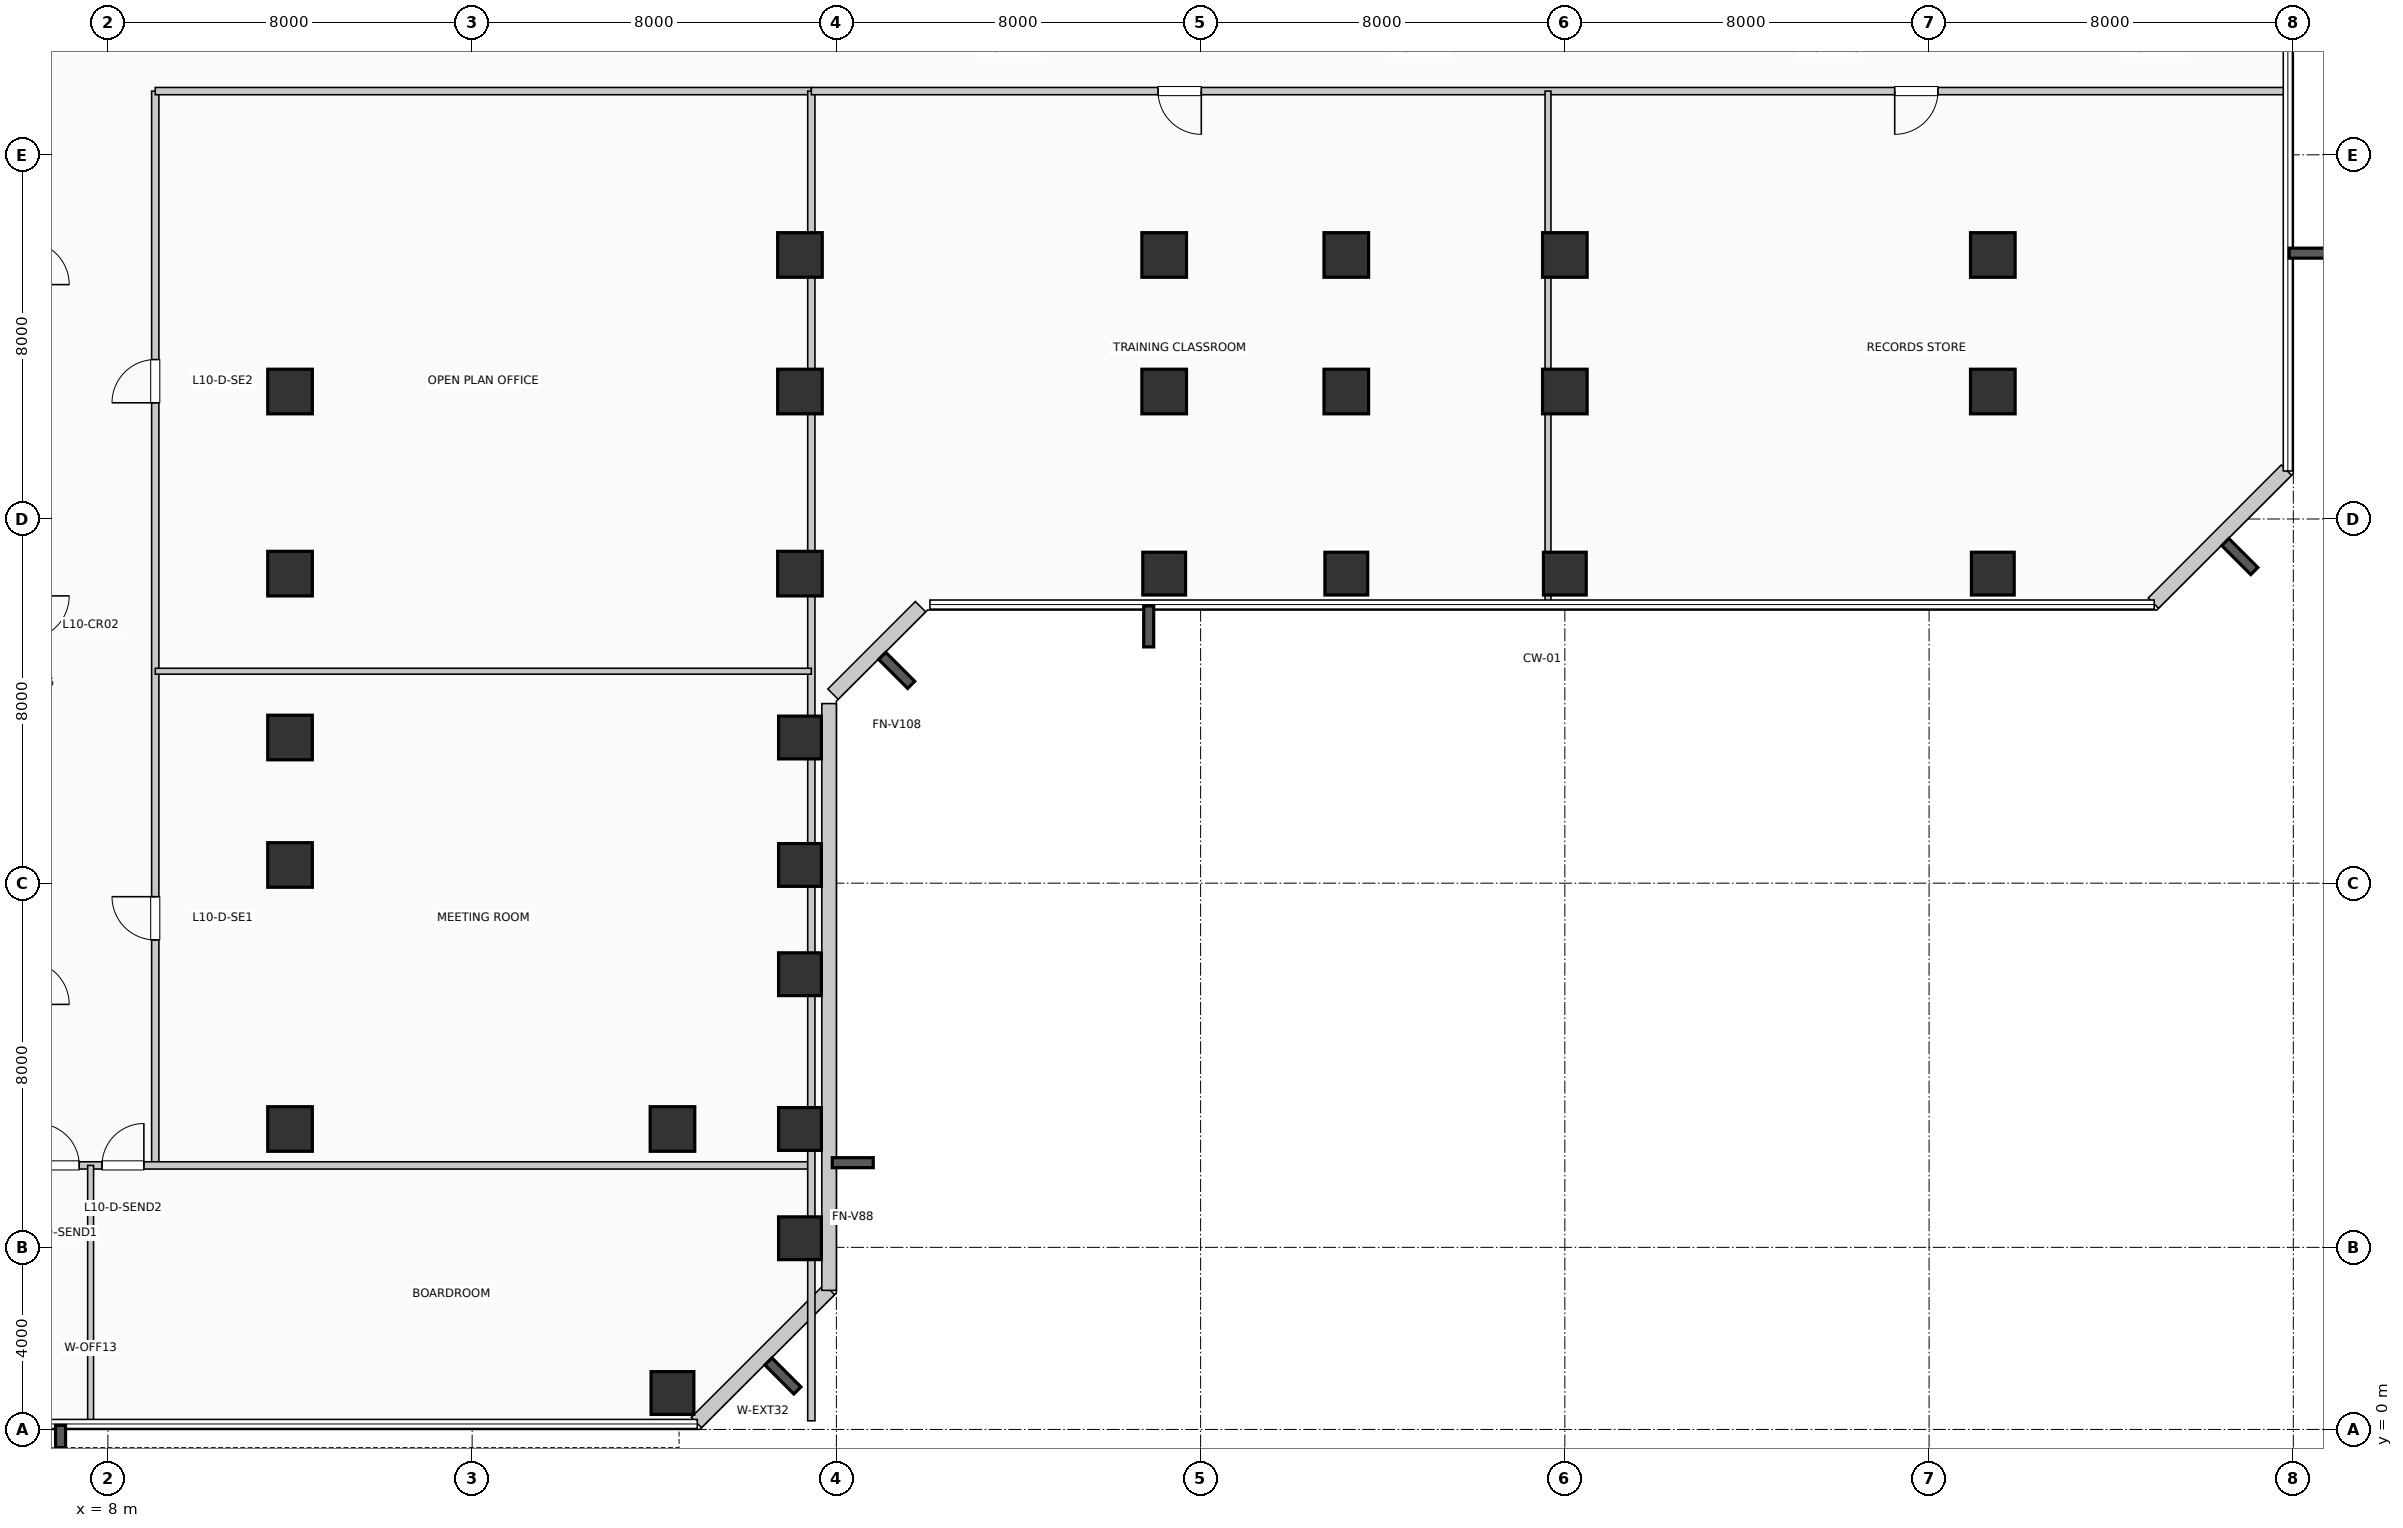
"""IFC4 building model, lengths in metres.
Left out: names, types, materials, properties, quantities, classifications, styles, units other than length and angle.
Written with IfcOpenShell. Run it as: python <this file> out.ifc"""

import sys

from ifc_helpers import new_model, si_unit, direction, frame, frame_2d, origin, origin_2d, place, context, subcontext, project, spatial, rectangle, extrude, element, fill, save


model = new_model("IFC4")
c1 = context("Model", 3, precision=1e-05, world=origin(), true_north=direction((0.0, 1.0)))
c2 = subcontext(c1, "Body", "Model", "MODEL_VIEW")
j1 = project(units=[si_unit("LENGTHUNIT", "METRE"), si_unit("PLANEANGLEUNIT", "RADIAN")], contexts=[c1])
p1 = place(None, origin())
s1 = spatial("IfcSite", under=j1, at=p1, CompositionType="ELEMENT")
p2 = place(p1, origin())
s2 = spatial("IfcBuilding", under=s1, at=p2, CompositionType="ELEMENT")
p3 = place(p2, frame((0.0, 0.0, 46.2)))
s3 = spatial("IfcBuildingStorey", under=s2, at=p3, CompositionType="ELEMENT", Elevation=46.2)
for number, where, z_axis, x_axis in (
    (1, (12.0, 6.6, 0.0), (0.0, 0.0, 1.0), (1.0, 0.0, 0.0)),
    (2, (12.0, 12.4, 0.0), (0.0, 0.0, 1.0), (1.0, 0.0, 0.0)),
    (3, (12.0, 15.2, 0.0), (0.0, 0.0, 1.0), (1.0, 0.0, 0.0)),
    (4, (12.0, 18.8, 0.0), (0.0, 0.0, 1.0), (1.0, 0.0, 0.0)),
    (5, (12.0, 22.8, 0.0), (0.0, 0.0, 1.0), (1.0, 0.0, 0.0)),
):
    element("IfcColumn", number, at=place(p3, frame(where, z_axis=z_axis, x_axis=x_axis)), inside=s3, PredefinedType="COLUMN", context=c2, shape_type="SweptSolid", body=[
        extrude(rectangle(XDim=0.98, YDim=0.98, at=origin_2d()), origin(), (0.0, 0.0, 1.0), 3.96),
    ])
p4 = place(p3, frame((20.4, 0.8, 0.0), z_axis=(0.0, 0.0, 1.0), x_axis=(1.0, 0.0, 0.0)))
e6 = element("IfcColumn", 6, at=p4, inside=s3, PredefinedType="COLUMN", context=c2, shape_type="SweptSolid", body=[
    extrude(rectangle(XDim=0.94, YDim=0.94, at=origin_2d()), origin(), (0.0, 0.0, 1.0), 3.96),
])
p5 = place(p3, frame((20.4, 6.6, 0.0), z_axis=(0.0, 0.0, 1.0), x_axis=(1.0, 0.0, 0.0)))
e7 = element("IfcColumn", 7, at=p5, inside=s3, PredefinedType="COLUMN", context=c2, shape_type="SweptSolid", body=[
    extrude(rectangle(XDim=0.98, YDim=0.98, at=origin_2d()), origin(), (0.0, 0.0, 1.0), 3.96),
])
for number, where, z_axis, x_axis in (
    (8, (23.2, 4.2, 0.0), (0.0, 0.0, 1.0), (1.0, 0.0, 0.0)),
    (9, (23.2, 6.6, 0.0), (0.0, 0.0, 1.0), (1.0, 0.0, 0.0)),
    (10, (23.2, 10.0, 0.0), (0.0, 0.0, 1.0), (1.0, 0.0, 0.0)),
    (11, (23.2, 12.4, 0.0), (0.0, 0.0, 1.0), (1.0, 0.0, 0.0)),
    (12, (23.2, 15.2, 0.0), (0.0, 0.0, 1.0), (1.0, 0.0, 0.0)),
):
    element("IfcColumn", number, at=place(p3, frame(where, z_axis=z_axis, x_axis=x_axis)), inside=s3, PredefinedType="COLUMN", context=c2, shape_type="SweptSolid", body=[
        extrude(rectangle(XDim=0.94, YDim=0.94, at=origin_2d()), origin(), (0.0, 0.0, 1.0), 3.96),
    ])
for number, where, z_axis, x_axis in (
    (13, (23.2, 18.8, 0.0), (0.0, 0.0, 1.0), (1.0, 0.0, 0.0)),
    (14, (23.2, 22.8, 0.0), (0.0, 0.0, 1.0), (1.0, 0.0, 0.0)),
    (15, (23.2, 25.8, 0.0), (0.0, 0.0, 1.0), (1.0, 0.0, 0.0)),
):
    element("IfcColumn", number, at=place(p3, frame(where, z_axis=z_axis, x_axis=x_axis)), inside=s3, PredefinedType="COLUMN", context=c2, shape_type="SweptSolid", body=[
        extrude(rectangle(XDim=0.98, YDim=0.98, at=origin_2d()), origin(), (0.0, 0.0, 1.0), 3.96),
    ])
p6 = place(p3, frame((31.2, 18.8, 0.0), z_axis=(0.0, 0.0, 1.0), x_axis=(1.0, 0.0, 0.0)))
e16 = element("IfcColumn", 16, at=p6, inside=s3, PredefinedType="COLUMN", context=c2, shape_type="SweptSolid", body=[
    extrude(rectangle(XDim=0.94, YDim=0.94, at=origin_2d()), origin(), (0.0, 0.0, 1.0), 3.96),
])
for number, where, z_axis, x_axis in (
    (17, (31.2, 22.8, 0.0), (0.0, 0.0, 1.0), (1.0, 0.0, 0.0)),
    (18, (31.2, 25.8, 0.0), (0.0, 0.0, 1.0), (1.0, 0.0, 0.0)),
):
    element("IfcColumn", number, at=place(p3, frame(where, z_axis=z_axis, x_axis=x_axis)), inside=s3, PredefinedType="COLUMN", context=c2, shape_type="SweptSolid", body=[
        extrude(rectangle(XDim=0.98, YDim=0.98, at=origin_2d()), origin(), (0.0, 0.0, 1.0), 3.96),
    ])
p7 = place(p3, frame((35.2, 18.8, 0.0), z_axis=(0.0, 0.0, 1.0), x_axis=(1.0, 0.0, 0.0)))
e19 = element("IfcColumn", 19, at=p7, inside=s3, PredefinedType="COLUMN", context=c2, shape_type="SweptSolid", body=[
    extrude(rectangle(XDim=0.94, YDim=0.94, at=origin_2d()), origin(), (0.0, 0.0, 1.0), 3.96),
])
for number, where, z_axis, x_axis in (
    (20, (35.2, 22.8, 0.0), (0.0, 0.0, 1.0), (1.0, 0.0, 0.0)),
    (21, (35.2, 25.8, 0.0), (0.0, 0.0, 1.0), (1.0, 0.0, 0.0)),
):
    element("IfcColumn", number, at=place(p3, frame(where, z_axis=z_axis, x_axis=x_axis)), inside=s3, PredefinedType="COLUMN", context=c2, shape_type="SweptSolid", body=[
        extrude(rectangle(XDim=0.98, YDim=0.98, at=origin_2d()), origin(), (0.0, 0.0, 1.0), 3.96),
    ])
p8 = place(p3, frame((40.0, 18.8, 0.0), z_axis=(0.0, 0.0, 1.0), x_axis=(1.0, 0.0, 0.0)))
e22 = element("IfcColumn", 22, at=p8, inside=s3, PredefinedType="COLUMN", context=c2, shape_type="SweptSolid", body=[
    extrude(rectangle(XDim=0.94, YDim=0.94, at=origin_2d()), origin(), (0.0, 0.0, 1.0), 3.96),
])
for number, where, z_axis, x_axis in (
    (23, (40.0, 22.8, 0.0), (0.0, 0.0, 1.0), (1.0, 0.0, 0.0)),
    (24, (40.0, 25.8, 0.0), (0.0, 0.0, 1.0), (1.0, 0.0, 0.0)),
):
    element("IfcColumn", number, at=place(p3, frame(where, z_axis=z_axis, x_axis=x_axis)), inside=s3, PredefinedType="COLUMN", context=c2, shape_type="SweptSolid", body=[
        extrude(rectangle(XDim=0.98, YDim=0.98, at=origin_2d()), origin(), (0.0, 0.0, 1.0), 3.96),
    ])
p9 = place(p3, frame((49.4, 18.8, 0.0), z_axis=(0.0, 0.0, 1.0), x_axis=(1.0, 0.0, 0.0)))
e25 = element("IfcColumn", 25, at=p9, inside=s3, PredefinedType="COLUMN", context=c2, shape_type="SweptSolid", body=[
    extrude(rectangle(XDim=0.94, YDim=0.94, at=origin_2d()), origin(), (0.0, 0.0, 1.0), 3.96),
])
for number, where, z_axis, x_axis in (
    (26, (49.4, 22.8, 0.0), (0.0, 0.0, 1.0), (1.0, 0.0, 0.0)),
    (27, (49.4, 25.8, 0.0), (0.0, 0.0, 1.0), (1.0, 0.0, 0.0)),
):
    element("IfcColumn", number, at=place(p3, frame(where, z_axis=z_axis, x_axis=x_axis)), inside=s3, PredefinedType="COLUMN", context=c2, shape_type="SweptSolid", body=[
        extrude(rectangle(XDim=0.98, YDim=0.98, at=origin_2d()), origin(), (0.0, 0.0, 1.0), 3.96),
    ])
p10 = place(p3, frame((20.926, 0.152, 0.0), z_axis=(0.0, 0.0, 1.0), x_axis=(0.707106781187, 0.707106781187, 0.0)))
e28 = element("IfcWall", 28, at=p10, inside=s3, PredefinedType="SOLIDWALL", context=c2, shape_type="SweptSolid", body=[
    extrude(rectangle(XDim=4.133, YDim=0.32, at=frame_2d((2.066, 0.0))), origin(), (0.0, 0.0, 1.0), 3.71),
])
p11 = place(p3, frame((23.84, 3.055, 0.0), z_axis=(0.0, 0.0, 1.0), x_axis=(0.0, 1.0, 0.0)))
e29 = element("IfcWall", 29, at=p11, inside=s3, PredefinedType="SOLIDWALL", context=c2, shape_type="SweptSolid", body=[
    extrude(rectangle(XDim=12.89, YDim=0.32, at=frame_2d((6.445, 0.0))), origin(), (0.0, 0.0, 1.0), 3.71),
])
p12 = place(p3, frame((23.926, 16.152, 0.0), z_axis=(0.0, 0.0, 1.0), x_axis=(0.707106781187, 0.707106781187, 0.0)))
e30 = element("IfcWall", 30, at=p12, inside=s3, PredefinedType="SOLIDWALL", context=c2, shape_type="SweptSolid", body=[
    extrude(rectangle(XDim=2.718, YDim=0.32, at=frame_2d((1.359, 0.0))), origin(), (0.0, 0.0, 1.0), 3.71),
])
p13 = place(p3, frame((52.926, 18.152, 0.0), z_axis=(0.0, 0.0, 1.0), x_axis=(0.707106781187, 0.707106781187, 0.0)))
e31 = element("IfcWall", 31, at=p13, inside=s3, PredefinedType="SOLIDWALL", context=c2, shape_type="SweptSolid", body=[
    extrude(rectangle(XDim=4.133, YDim=0.32, at=frame_2d((2.066, 0.0))), origin(), (0.0, 0.0, 1.0), 3.71),
])
p14 = place(p3, frame((9.04, 5.8, 0.0), z_axis=(0.0, 0.0, 1.0), x_axis=(0.0, 1.0, 0.0)))
e32 = element("IfcWall", 32, at=p14, inside=s3, PredefinedType="PARTITIONING", context=c2, shape_type="SweptSolid", body=[
    extrude(rectangle(XDim=23.6, YDim=0.16, at=frame_2d((11.8, 0.0))), origin(), (0.0, 0.0, 1.0), 3.71),
])
p15 = place(p14, frame((4.953, 0.0, 0.0)))
e33 = element("IfcOpeningElement", 33, at=p15, cuts=e32, PredefinedType="OPENING", context=c2, shape_type="SweptSolid", body=[
    extrude(rectangle(XDim=0.95, YDim=2.15, at=frame_2d((0.475, 1.075))), frame((0.0, 0.09, 0.0), z_axis=(0.0, -1.0, 0.0), x_axis=(1.0, 0.0, 0.0)), (0.0, 0.0, 1.0), 0.18),
])
p16 = place(p14, frame((16.753, 0.0, 0.0)))
e34 = element("IfcOpeningElement", 34, at=p16, cuts=e32, PredefinedType="OPENING", context=c2, shape_type="SweptSolid", body=[
    extrude(rectangle(XDim=0.95, YDim=2.15, at=frame_2d((0.475, 1.075))), frame((0.0, 0.09, 0.0), z_axis=(0.0, -1.0, 0.0), x_axis=(1.0, 0.0, 0.0)), (0.0, 0.0, 1.0), 0.18),
])
p17 = place(p3, frame((0.19, 5.8, 0.0), z_axis=(0.0, 0.0, 1.0), x_axis=(1.0, 0.0, 0.0)))
e35 = element("IfcWall", 35, at=p17, inside=s3, PredefinedType="PARTITIONING", context=c2, shape_type="SweptSolid", body=[
    extrude(rectangle(XDim=23.26, YDim=0.16, at=frame_2d((11.63, 0.0))), origin(), (0.0, 0.0, 1.0), 3.71),
])
p18 = place(p17, frame((6.26, 0.0, 0.0)))
e36 = element("IfcOpeningElement", 36, at=p18, cuts=e35, PredefinedType="OPENING", context=c2, shape_type="SweptSolid", body=[
    extrude(rectangle(XDim=0.92, YDim=2.1, at=frame_2d((0.46, 1.05))), frame((0.0, 0.09, 0.0), z_axis=(0.0, -1.0, 0.0), x_axis=(1.0, 0.0, 0.0)), (0.0, 0.0, 1.0), 0.18),
])
p19 = place(p17, frame((7.68, 0.0, 0.0)))
e37 = element("IfcOpeningElement", 37, at=p19, cuts=e35, PredefinedType="OPENING", context=c2, shape_type="SweptSolid", body=[
    extrude(rectangle(XDim=0.92, YDim=2.1, at=frame_2d((0.46, 1.05))), frame((0.0, 0.09, 0.0), z_axis=(0.0, -1.0, 0.0), x_axis=(1.0, 0.0, 0.0)), (0.0, 0.0, 1.0), 0.18),
])
p20 = place(p3, frame((9.04, 29.4, 0.0), z_axis=(0.0, 0.0, 1.0), x_axis=(1.0, 0.0, 0.0)))
e38 = element("IfcWall", 38, at=p20, inside=s3, PredefinedType="PARTITIONING", context=c2, shape_type="SweptSolid", body=[
    extrude(rectangle(XDim=14.41, YDim=0.16, at=frame_2d((7.205, 0.0))), origin(), (0.0, 0.0, 1.0), 3.365),
])
p21 = place(p3, frame((23.45, 0.19, 0.0), z_axis=(0.0, 0.0, 1.0), x_axis=(0.0, 1.0, 0.0)))
e39 = element("IfcWall", 39, at=p21, inside=s3, PredefinedType="PARTITIONING", context=c2, shape_type="SweptSolid", body=[
    extrude(rectangle(XDim=29.21, YDim=0.16, at=frame_2d((14.605, 0.0))), origin(), (0.0, 0.0, 1.0), 2.995),
])
p22 = place(p3, frame((7.62, 0.19, 0.0), z_axis=(0.0, 0.0, 1.0), x_axis=(0.0, 1.0, 0.0)))
e40 = element("IfcWall", 40, at=p22, inside=s3, PredefinedType="PARTITIONING", context=c2, shape_type="SweptSolid", body=[
    extrude(rectangle(XDim=5.61, YDim=0.13, at=frame_2d((2.805, 0.0))), origin(), (0.0, 0.0, 1.0), 3.71),
])
p23 = place(p3, frame((9.04, 16.656, 0.0), z_axis=(0.0, 0.0, 1.0), x_axis=(1.0, 0.0, 0.0)))
e41 = element("IfcWall", 41, at=p23, inside=s3, PredefinedType="PARTITIONING", context=c2, shape_type="SweptSolid", body=[
    extrude(rectangle(XDim=14.41, YDim=0.13, at=frame_2d((7.205, 0.0))), origin(), (0.0, 0.0, 1.0), 3.71),
])
p24 = place(p3, frame((23.45, 29.4, 0.0), z_axis=(0.0, 0.0, 1.0), x_axis=(1.0, 0.0, 0.0)))
e42 = element("IfcWall", 42, at=p24, inside=s3, PredefinedType="PARTITIONING", context=c2, shape_type="SweptSolid", body=[
    extrude(rectangle(XDim=32.36, YDim=0.16, at=frame_2d((16.18, 0.0))), origin(), (0.0, 0.0, 1.0), 3.365),
])
p25 = place(p24, frame((8.565, 0.0, 0.0), z_axis=(0.0, 0.0, 1.0), x_axis=(-1.0, 0.0, 0.0)))
e43 = element("IfcOpeningElement", 43, at=p25, cuts=e42, PredefinedType="OPENING", context=c2, shape_type="SweptSolid", body=[
    extrude(rectangle(XDim=0.95, YDim=2.15, at=frame_2d((0.475, 1.075))), frame((0.0, 0.09, 0.0), z_axis=(0.0, -1.0, 0.0), x_axis=(1.0, 0.0, 0.0)), (0.0, 0.0, 1.0), 0.18),
])
p26 = place(p24, frame((24.745, 0.0, 0.0), z_axis=(0.0, 0.0, 1.0), x_axis=(-1.0, 0.0, 0.0)))
e44 = element("IfcOpeningElement", 44, at=p26, cuts=e42, PredefinedType="OPENING", context=c2, shape_type="SweptSolid", body=[
    extrude(rectangle(XDim=0.95, YDim=2.15, at=frame_2d((0.475, 1.075))), frame((0.0, 0.09, 0.0), z_axis=(0.0, -1.0, 0.0), x_axis=(1.0, 0.0, 0.0)), (0.0, 0.0, 1.0), 0.18),
])
p27 = place(p3, frame((39.63, 18.19, 0.0), z_axis=(0.0, 0.0, 1.0), x_axis=(0.0, 1.0, 0.0)))
e45 = element("IfcWall", 45, at=p27, inside=s3, PredefinedType="PARTITIONING", context=c2, shape_type="SweptSolid", body=[
    extrude(rectangle(XDim=11.21, YDim=0.13, at=frame_2d((5.605, 0.0))), origin(), (0.0, 0.0, 1.0), 2.995),
])
p28 = place(p18, origin())
e46 = element("IfcDoor", 46, at=p28, inside=s3, OperationType="SINGLE_SWING_LEFT", PredefinedType="DOOR", context=c2, shape_type="SweptSolid", body=[
    extrude(rectangle(XDim=0.92, YDim=2.1, at=frame_2d((0.46, 1.05))), frame((0.0, 0.025, 0.0), z_axis=(0.0, -1.0, 0.0), x_axis=(1.0, 0.0, 0.0)), (0.0, 0.0, 1.0), 0.05),
])
fill(e36, e46)
p29 = place(p19, origin())
e47 = element("IfcDoor", 47, at=p29, inside=s3, OperationType="SINGLE_SWING_RIGHT", PredefinedType="DOOR", context=c2, shape_type="SweptSolid", body=[
    extrude(rectangle(XDim=0.92, YDim=2.1, at=frame_2d((0.46, 1.05))), frame((0.0, 0.025, 0.0), z_axis=(0.0, -1.0, 0.0), x_axis=(1.0, 0.0, 0.0)), (0.0, 0.0, 1.0), 0.05),
])
fill(e37, e47)
p30 = place(p15, origin())
e48 = element("IfcDoor", 48, at=p30, inside=s3, OperationType="SINGLE_SWING_RIGHT", PredefinedType="DOOR", context=c2, shape_type="SweptSolid", body=[
    extrude(rectangle(XDim=0.95, YDim=2.15, at=frame_2d((0.475, 1.075))), frame((0.0, 0.025, 0.0), z_axis=(0.0, -1.0, 0.0), x_axis=(1.0, 0.0, 0.0)), (0.0, 0.0, 1.0), 0.05),
])
fill(e33, e48)
p31 = place(p16, origin())
e49 = element("IfcDoor", 49, at=p31, inside=s3, OperationType="SINGLE_SWING_LEFT", PredefinedType="DOOR", context=c2, shape_type="SweptSolid", body=[
    extrude(rectangle(XDim=0.95, YDim=2.15, at=frame_2d((0.475, 1.075))), frame((0.0, 0.025, 0.0), z_axis=(0.0, -1.0, 0.0), x_axis=(1.0, 0.0, 0.0)), (0.0, 0.0, 1.0), 0.05),
])
fill(e34, e49)
p32 = place(p25, origin())
e50 = element("IfcDoor", 50, at=p32, inside=s3, OperationType="SINGLE_SWING_RIGHT", PredefinedType="DOOR", context=c2, shape_type="SweptSolid", body=[
    extrude(rectangle(XDim=0.95, YDim=2.15, at=frame_2d((0.475, 1.075))), frame((0.0, 0.025, 0.0), z_axis=(0.0, -1.0, 0.0), x_axis=(1.0, 0.0, 0.0)), (0.0, 0.0, 1.0), 0.05),
])
fill(e43, e50)
p33 = place(p26, origin())
e51 = element("IfcDoor", 51, at=p33, inside=s3, OperationType="SINGLE_SWING_LEFT", PredefinedType="DOOR", context=c2, shape_type="SweptSolid", body=[
    extrude(rectangle(XDim=0.95, YDim=2.15, at=frame_2d((0.475, 1.075))), frame((0.0, 0.025, 0.0), z_axis=(0.0, -1.0, 0.0), x_axis=(1.0, 0.0, 0.0)), (0.0, 0.0, 1.0), 0.05),
])
fill(e44, e51)
save(model, sys.argv[1])
